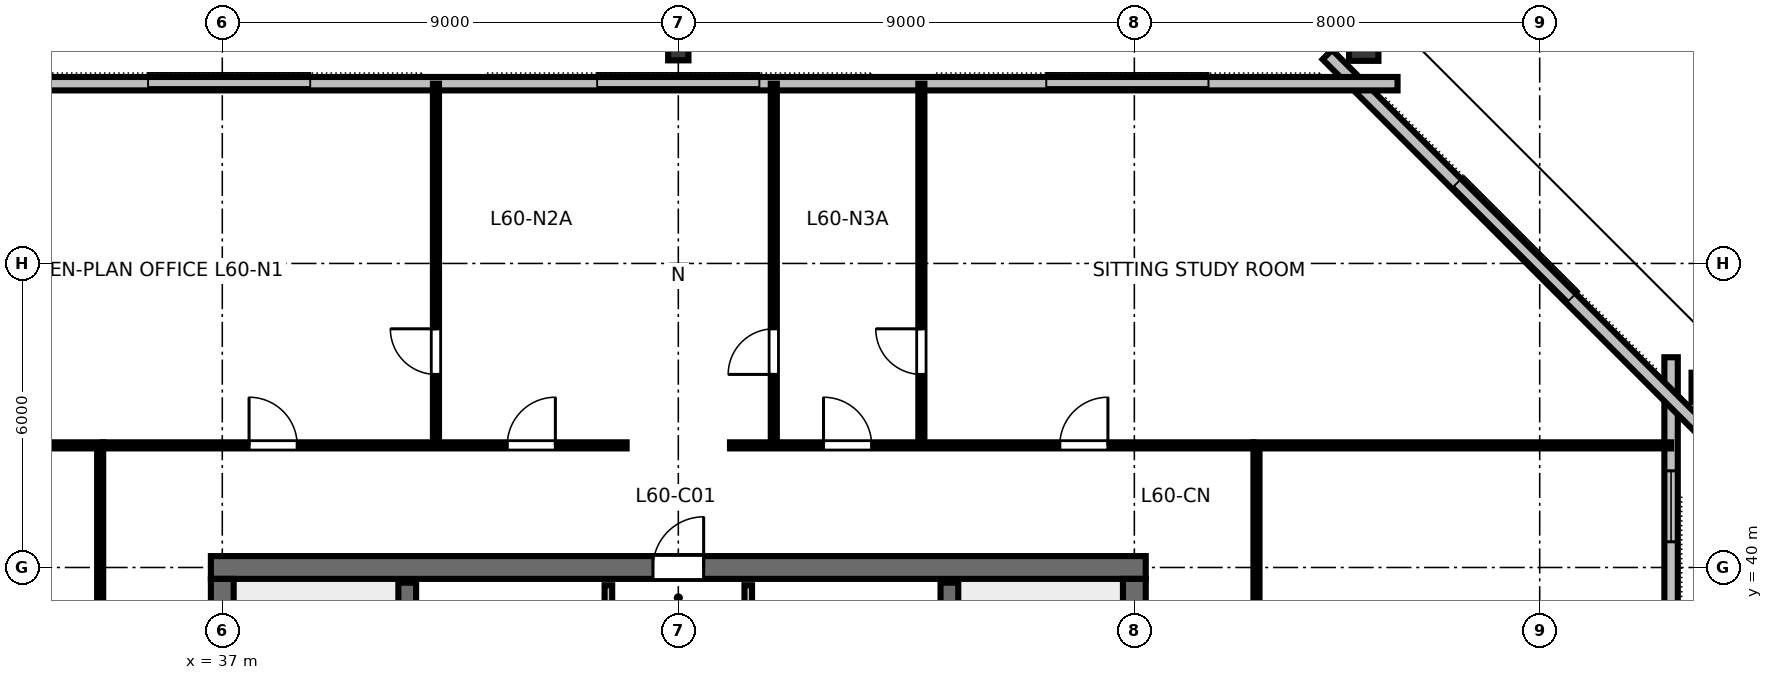
"""IFC4 building model, lengths in metres.
Left out: names, types, materials, properties, quantities, classifications, styles, units other than length and angle.
Written with IfcOpenShell. Run it as: python <this file> out.ifc"""

import sys

from ifc_helpers import new_model, si_unit, direction, frame, frame_2d, origin, origin_2d, place, context, subcontext, project, spatial, rectangle, hollow_rectangle, i_section, extrude, element, fill, save


model = new_model("IFC4")
c1 = context("Model", 3, precision=1e-05, world=origin(), true_north=direction((0.0, 1.0)))
c2 = subcontext(c1, "Body", "Model", "MODEL_VIEW")
j1 = project(units=[si_unit("LENGTHUNIT", "METRE"), si_unit("PLANEANGLEUNIT", "RADIAN")], contexts=[c1])
p1 = place(None, origin())
s1 = spatial("IfcSite", under=j1, at=p1, CompositionType="ELEMENT")
p2 = place(p1, origin())
s2 = spatial("IfcBuilding", under=s1, at=p2, CompositionType="ELEMENT")
p3 = place(p2, frame((0.0, 0.0, 227.4)))
s3 = spatial("IfcBuildingStorey", under=s2, at=p3, CompositionType="ELEMENT", Elevation=227.4)
p4 = place(p3, frame((36.775, 40.0, 0.0), z_axis=(0.0, 0.0, 1.0), x_axis=(1.0, 0.0, 0.0)))
e1 = element("IfcWall", 1, at=p4, inside=s3, PredefinedType="SHEAR", context=c2, shape_type="SweptSolid", body=[
    extrude(rectangle(XDim=18.45, YDim=0.45, at=frame_2d((9.225, 0.0))), origin(), (0.0, 0.0, 1.0), 3.36),
])
p5 = place(p4, frame((8.725, 0.0, 0.0)))
e2 = element("IfcOpeningElement", 2, at=p5, cuts=e1, PredefinedType="OPENING", context=c2, shape_type="SweptSolid", body=[
    extrude(rectangle(XDim=1.0, YDim=2.15, at=frame_2d((0.5, 1.075))), frame((0.0, 0.235, 0.0), z_axis=(0.0, -1.0, 0.0), x_axis=(1.0, 0.0, 0.0)), (0.0, 0.0, 1.0), 0.47),
])
p6 = place(p3, frame((37.0, 24.225, 0.0), z_axis=(0.0, 0.0, 1.0), x_axis=(0.0, 1.0, 0.0)))
e3 = element("IfcWall", 3, at=p6, inside=s3, PredefinedType="SHEAR", context=c2, shape_type="SweptSolid", body=[
    extrude(rectangle(XDim=15.55, YDim=0.45, at=frame_2d((7.775, 0.0))), origin(), (0.0, 0.0, 1.0), 3.36),
])
p7 = place(p6, frame((5.3, 0.0, 0.0)))
e4 = element("IfcOpeningElement", 4, at=p7, cuts=e3, PredefinedType="OPENING", context=c2, shape_type="SweptSolid", body=[
    extrude(rectangle(XDim=1.15, YDim=2.15, at=frame_2d((0.575, 1.075))), frame((0.0, 0.235, 0.0), z_axis=(0.0, -1.0, 0.0), x_axis=(1.0, 0.0, 0.0)), (0.0, 0.0, 1.0), 0.47),
])
p8 = place(p3, frame((55.0, 24.225, 0.0), z_axis=(0.0, 0.0, 1.0), x_axis=(0.0, 1.0, 0.0)))
e5 = element("IfcWall", 5, at=p8, inside=s3, PredefinedType="SHEAR", context=c2, shape_type="SweptSolid", body=[
    extrude(rectangle(XDim=15.55, YDim=0.45, at=frame_2d((7.775, 0.0))), origin(), (0.0, 0.0, 1.0), 3.36),
])
p9 = place(p8, frame((5.3, 0.0, 0.0)))
e6 = element("IfcOpeningElement", 6, at=p9, cuts=e5, PredefinedType="OPENING", context=c2, shape_type="SweptSolid", body=[
    extrude(rectangle(XDim=1.15, YDim=2.15, at=frame_2d((0.575, 1.075))), frame((0.0, 0.235, 0.0), z_axis=(0.0, -1.0, 0.0), x_axis=(1.0, 0.0, 0.0)), (0.0, 0.0, 1.0), 0.47),
])
p10 = place(p3, frame((66.347, 43.554, 0.0), z_axis=(-0.177516374376, -0.155854312843, 0.971698188738), x_axis=(0.730201092603, 0.64109572948, 0.236225803001)))
e7 = element("IfcColumn", 7, at=p10, inside=s3, PredefinedType="COLUMN", context=c2, shape_type="SweptSolid", body=[
    extrude(hollow_rectangle(XDim=0.58, YDim=0.7, WallThickness=0.032, at=origin_2d()), origin(), (0.0, 0.0, 1.0), 3.471),
])
p11 = place(p3, frame((59.527, 50.348, 0.0), z_axis=(-0.20550333397, -0.12726317196, 0.970346569422), x_axis=(0.526494647851, -0.850178443495, 0.0)))
e8 = element("IfcColumn", 8, at=p11, inside=s3, PredefinedType="COLUMN", context=c2, shape_type="SweptSolid", body=[
    extrude(hollow_rectangle(XDim=0.58, YDim=0.7, WallThickness=0.032, at=origin_2d()), origin(), (0.0, 0.0, 1.0), 3.476),
])
p12 = place(p3, frame((46.0, 50.207, 0.0), z_axis=(0.0, -0.128274255688, 0.991738733401), x_axis=(1.0, 0.0, 0.0)))
e9 = element("IfcColumn", 9, at=p12, inside=s3, PredefinedType="COLUMN", context=c2, shape_type="SweptSolid", body=[
    extrude(i_section(OverallWidth=0.401, OverallDepth=0.399, WebThickness=0.025, FlangeThickness=0.04, FilletRadius=0.025, at=origin_2d()), origin(), (0.0, 0.0, 1.0), 3.401),
])
p13 = place(p3, frame((65.593, 19.851, 0.0), z_axis=(0.0, 0.0, 1.0), x_axis=(0.0, 1.0, 0.0)))
e10 = element("IfcWall", 10, at=p13, inside=s3, PredefinedType="STANDARD", context=c2, shape_type="SweptSolid", body=[
    extrude(rectangle(XDim=24.298, YDim=0.265, at=frame_2d((12.149, 0.0))), origin(), (0.0, 0.0, 1.0), 2.832),
])
p14 = place(p13, frame((13.499, 0.0, 0.0)))
e11 = element("IfcOpeningElement", 11, at=p14, cuts=e10, PredefinedType="OPENING", context=c2, shape_type="SweptSolid", body=[
    extrude(rectangle(XDim=1.4, YDim=2.15, at=frame_2d((0.7, 1.075))), frame((0.0, 0.142, 0.0), z_axis=(0.0, -1.0, 0.0), x_axis=(1.0, 0.0, 0.0)), (0.0, 0.0, 1.0), 0.285),
])
p15 = place(p13, frame((2.241, 0.0, 0.85)))
e12 = element("IfcOpeningElement", 12, at=p15, cuts=e10, PredefinedType="OPENING", context=c2, shape_type="SweptSolid", body=[
    extrude(rectangle(XDim=1.4, YDim=1.2, at=frame_2d((0.7, 0.6))), frame((0.0, 0.142, 0.0), z_axis=(0.0, -1.0, 0.0), x_axis=(1.0, 0.0, 0.0)), (0.0, 0.0, 1.0), 0.285),
])
p16 = place(p13, frame((5.925, 0.0, 0.85)))
e13 = element("IfcOpeningElement", 13, at=p16, cuts=e10, PredefinedType="OPENING", context=c2, shape_type="SweptSolid", body=[
    extrude(rectangle(XDim=1.4, YDim=1.2, at=frame_2d((0.7, 0.6))), frame((0.0, 0.142, 0.0), z_axis=(0.0, -1.0, 0.0), x_axis=(1.0, 0.0, 0.0)), (0.0, 0.0, 1.0), 0.285),
])
p17 = place(p13, frame((9.608, 0.0, 0.85)))
e14 = element("IfcOpeningElement", 14, at=p17, cuts=e10, PredefinedType="OPENING", context=c2, shape_type="SweptSolid", body=[
    extrude(rectangle(XDim=1.4, YDim=1.2, at=frame_2d((0.7, 0.6))), frame((0.0, 0.142, 0.0), z_axis=(0.0, -1.0, 0.0), x_axis=(1.0, 0.0, 0.0)), (0.0, 0.0, 1.0), 0.285),
])
p18 = place(p13, frame((16.974, 0.0, 0.85)))
e15 = element("IfcOpeningElement", 15, at=p18, cuts=e10, PredefinedType="OPENING", context=c2, shape_type="SweptSolid", body=[
    extrude(rectangle(XDim=1.4, YDim=1.2, at=frame_2d((0.7, 0.6))), frame((0.0, 0.142, 0.0), z_axis=(0.0, -1.0, 0.0), x_axis=(1.0, 0.0, 0.0)), (0.0, 0.0, 1.0), 0.285),
])
p19 = place(p13, frame((20.657, 0.0, 0.85)))
e16 = element("IfcOpeningElement", 16, at=p19, cuts=e10, PredefinedType="OPENING", context=c2, shape_type="SweptSolid", body=[
    extrude(rectangle(XDim=1.4, YDim=1.2, at=frame_2d((0.7, 0.6))), frame((0.0, 0.142, 0.0), z_axis=(0.0, -1.0, 0.0), x_axis=(1.0, 0.0, 0.0)), (0.0, 0.0, 1.0), 0.285),
])
p20 = place(p3, frame((66.167, 42.764, 0.0), z_axis=(0.0, 0.0, 1.0), x_axis=(-0.707106781187, 0.707106781187, 0.0)))
e17 = element("IfcWall", 17, at=p20, inside=s3, PredefinedType="STANDARD", context=c2, shape_type="SweptSolid", body=[
    extrude(rectangle(XDim=10.405, YDim=0.265, at=frame_2d((5.203, 0.0))), origin(), (0.0, 0.0, 1.0), 2.832),
])
p21 = place(p3, frame((60.195, 49.547, 0.0), z_axis=(0.0, 0.0, 1.0), x_axis=(-1.0, 0.0, 0.0)))
e18 = element("IfcWall", 18, at=p21, inside=s3, PredefinedType="STANDARD", context=c2, shape_type="SweptSolid", body=[
    extrude(rectangle(XDim=28.389, YDim=0.265, at=frame_2d((14.195, 0.0))), origin(), (0.0, 0.0, 1.0), 2.832),
])
for number, where, z_axis, x_axis in (
    (19, (40.65, 32.0, 0.0), (0.0, 0.0, 1.0), (0.0, 1.0, 0.0)),
    (20, (51.35, 32.0, 0.0), (0.0, 0.0, 1.0), (0.0, 1.0, 0.0)),
):
    element("IfcWall", number, at=place(p3, frame(where, z_axis=z_axis, x_axis=x_axis)), inside=s3, PredefinedType="SHEAR", context=c2, shape_type="SweptSolid", body=[
        extrude(rectangle(XDim=7.7, YDim=0.35, at=frame_2d((3.85, 0.0))), origin(), (0.0, 0.0, 1.0), 3.6),
    ])
p22 = place(p3, frame((44.62, 35.72, 0.0), z_axis=(0.0, 0.0, 1.0), x_axis=(0.0, 1.0, 0.0)))
e21 = element("IfcWall", 21, at=p22, inside=s3, PredefinedType="PARTITIONING", context=c2, shape_type="SweptSolid", body=[
    extrude(rectangle(XDim=3.93, YDim=0.15, at=frame_2d((1.965, 0.0))), origin(), (0.0, 0.0, 1.0), 3.375),
])
p23 = place(p22, frame((1.5, 0.0, 0.0)))
e22 = element("IfcOpeningElement", 22, at=p23, cuts=e21, PredefinedType="OPENING", context=c2, shape_type="SweptSolid", body=[
    extrude(rectangle(XDim=0.9, YDim=2.15, at=frame_2d((0.45, 1.075))), frame((0.0, 0.085, 0.0), z_axis=(0.0, -1.0, 0.0), x_axis=(1.0, 0.0, 0.0)), (0.0, 0.0, 1.0), 0.17),
])
p24 = place(p3, frame((47.38, 35.72, 0.0), z_axis=(0.0, 0.0, 1.0), x_axis=(0.0, 1.0, 0.0)))
e23 = element("IfcWall", 23, at=p24, inside=s3, PredefinedType="PARTITIONING", context=c2, shape_type="SweptSolid", body=[
    extrude(rectangle(XDim=3.93, YDim=0.15, at=frame_2d((1.965, 0.0))), origin(), (0.0, 0.0, 1.0), 3.375),
])
p25 = place(p24, frame((1.5, 0.0, 0.0)))
e24 = element("IfcOpeningElement", 24, at=p25, cuts=e23, PredefinedType="OPENING", context=c2, shape_type="SweptSolid", body=[
    extrude(rectangle(XDim=0.9, YDim=2.15, at=frame_2d((0.45, 1.075))), frame((0.0, 0.085, 0.0), z_axis=(0.0, -1.0, 0.0), x_axis=(1.0, 0.0, 0.0)), (0.0, 0.0, 1.0), 0.17),
])
p26 = place(p3, frame((41.217, 42.41, 0.0), z_axis=(0.0, 0.0, 1.0), x_axis=(0.0, 1.0, 0.0)))
e25 = element("IfcWall", 25, at=p26, inside=s3, PredefinedType="PARTITIONING", context=c2, shape_type="SweptSolid", body=[
    extrude(rectangle(XDim=7.137, YDim=0.12, at=frame_2d((3.569, 0.0))), origin(), (0.0, 0.0, 1.0), 2.655),
])
p27 = place(p26, frame((1.4, 0.0, 0.0)))
e26 = element("IfcOpeningElement", 26, at=p27, cuts=e25, PredefinedType="OPENING", context=c2, shape_type="SweptSolid", body=[
    extrude(rectangle(XDim=0.9, YDim=2.15, at=frame_2d((0.45, 1.075))), frame((0.0, 0.07, 0.0), z_axis=(0.0, -1.0, 0.0), x_axis=(1.0, 0.0, 0.0)), (0.0, 0.0, 1.0), 0.14),
])
p28 = place(p3, frame((47.885, 42.41, 0.0), z_axis=(0.0, 0.0, 1.0), x_axis=(0.0, 1.0, 0.0)))
e27 = element("IfcWall", 27, at=p28, inside=s3, PredefinedType="PARTITIONING", context=c2, shape_type="SweptSolid", body=[
    extrude(rectangle(XDim=7.137, YDim=0.12, at=frame_2d((3.569, 0.0))), origin(), (0.0, 0.0, 1.0), 2.655),
])
p29 = place(p28, frame((1.4, 0.0, 0.0)))
e28 = element("IfcOpeningElement", 28, at=p29, cuts=e27, PredefinedType="OPENING", context=c2, shape_type="SweptSolid", body=[
    extrude(rectangle(XDim=0.9, YDim=2.15, at=frame_2d((0.45, 1.075))), frame((0.0, 0.07, 0.0), z_axis=(0.0, -1.0, 0.0), x_axis=(1.0, 0.0, 0.0)), (0.0, 0.0, 1.0), 0.14),
])
p30 = place(p3, frame((50.797, 42.41, 0.0), z_axis=(0.0, 0.0, 1.0), x_axis=(0.0, 1.0, 0.0)))
e29 = element("IfcWall", 29, at=p30, inside=s3, PredefinedType="PARTITIONING", context=c2, shape_type="SweptSolid", body=[
    extrude(rectangle(XDim=7.137, YDim=0.12, at=frame_2d((3.569, 0.0))), origin(), (0.0, 0.0, 1.0), 2.655),
])
p31 = place(p30, frame((1.4, 0.0, 0.0)))
e30 = element("IfcOpeningElement", 30, at=p31, cuts=e29, PredefinedType="OPENING", context=c2, shape_type="SweptSolid", body=[
    extrude(rectangle(XDim=0.9, YDim=2.15, at=frame_2d((0.45, 1.075))), frame((0.0, 0.07, 0.0), z_axis=(0.0, -1.0, 0.0), x_axis=(1.0, 0.0, 0.0)), (0.0, 0.0, 1.0), 0.14),
])
p32 = place(p3, frame((34.65, 42.41, 0.0), z_axis=(0.0, 0.0, 1.0), x_axis=(1.0, 0.0, 0.0)))
e31 = element("IfcWall", 31, at=p32, inside=s3, PredefinedType="PARTITIONING", context=c2, shape_type="SweptSolid", body=[
    extrude(rectangle(XDim=10.33, YDim=0.12, at=frame_2d((5.165, 0.0))), origin(), (0.0, 0.0, 1.0), 2.655),
])
p33 = place(p32, frame((2.878, 0.0, 0.0)))
e32 = element("IfcOpeningElement", 32, at=p33, cuts=e31, PredefinedType="OPENING", context=c2, shape_type="SweptSolid", body=[
    extrude(rectangle(XDim=0.95, YDim=2.15, at=frame_2d((0.475, 1.075))), frame((0.0, 0.07, 0.0), z_axis=(0.0, -1.0, 0.0), x_axis=(1.0, 0.0, 0.0)), (0.0, 0.0, 1.0), 0.14),
])
p34 = place(p32, frame((7.974, 0.0, 0.0)))
e33 = element("IfcOpeningElement", 33, at=p34, cuts=e31, PredefinedType="OPENING", context=c2, shape_type="SweptSolid", body=[
    extrude(rectangle(XDim=0.95, YDim=2.15, at=frame_2d((0.475, 1.075))), frame((0.0, 0.07, 0.0), z_axis=(0.0, -1.0, 0.0), x_axis=(1.0, 0.0, 0.0)), (0.0, 0.0, 1.0), 0.14),
])
p35 = place(p3, frame((47.02, 42.41, 0.0), z_axis=(0.0, 0.0, 1.0), x_axis=(1.0, 0.0, 0.0)))
e34 = element("IfcWall", 34, at=p35, inside=s3, PredefinedType="PARTITIONING", context=c2, shape_type="SweptSolid", body=[
    extrude(rectangle(XDim=10.33, YDim=0.12, at=frame_2d((5.165, 0.0))), origin(), (0.0, 0.0, 1.0), 2.655),
])
p36 = place(p35, frame((1.846, 0.0, 0.0)))
e35 = element("IfcOpeningElement", 35, at=p36, cuts=e34, PredefinedType="OPENING", context=c2, shape_type="SweptSolid", body=[
    extrude(rectangle(XDim=0.95, YDim=2.15, at=frame_2d((0.475, 1.075))), frame((0.0, 0.07, 0.0), z_axis=(0.0, -1.0, 0.0), x_axis=(1.0, 0.0, 0.0)), (0.0, 0.0, 1.0), 0.14),
])
p37 = place(p35, frame((6.509, 0.0, 0.0)))
e36 = element("IfcOpeningElement", 36, at=p37, cuts=e34, PredefinedType="OPENING", context=c2, shape_type="SweptSolid", body=[
    extrude(rectangle(XDim=0.95, YDim=2.15, at=frame_2d((0.475, 1.075))), frame((0.0, 0.07, 0.0), z_axis=(0.0, -1.0, 0.0), x_axis=(1.0, 0.0, 0.0)), (0.0, 0.0, 1.0), 0.14),
])
p38 = place(p3, frame((34.59, 21.65, 0.0), z_axis=(0.0, 0.0, 1.0), x_axis=(0.0, 1.0, 0.0)))
e37 = element("IfcWall", 37, at=p38, inside=s3, PredefinedType="PARTITIONING", context=c2, shape_type="SweptSolid", body=[
    extrude(rectangle(XDim=20.7, YDim=0.12, at=frame_2d((10.35, 0.0))), origin(), (0.0, 0.0, 1.0), 2.655),
])
p39 = place(p38, frame((5.449, 0.0, 0.0)))
e38 = element("IfcOpeningElement", 38, at=p39, cuts=e37, PredefinedType="OPENING", context=c2, shape_type="SweptSolid", body=[
    extrude(rectangle(XDim=0.95, YDim=2.15, at=frame_2d((0.475, 1.075))), frame((0.0, 0.07, 0.0), z_axis=(0.0, -1.0, 0.0), x_axis=(1.0, 0.0, 0.0)), (0.0, 0.0, 1.0), 0.14),
])
p40 = place(p38, frame((15.599, 0.0, 0.0)))
e39 = element("IfcOpeningElement", 39, at=p40, cuts=e37, PredefinedType="OPENING", context=c2, shape_type="SweptSolid", body=[
    extrude(rectangle(XDim=0.95, YDim=2.15, at=frame_2d((0.475, 1.075))), frame((0.0, 0.07, 0.0), z_axis=(0.0, -1.0, 0.0), x_axis=(1.0, 0.0, 0.0)), (0.0, 0.0, 1.0), 0.14),
])
p41 = place(p3, frame((57.41, 21.65, 0.0), z_axis=(0.0, 0.0, 1.0), x_axis=(0.0, 1.0, 0.0)))
e40 = element("IfcWall", 40, at=p41, inside=s3, PredefinedType="PARTITIONING", context=c2, shape_type="SweptSolid", body=[
    extrude(rectangle(XDim=20.7, YDim=0.12, at=frame_2d((10.35, 0.0))), origin(), (0.0, 0.0, 1.0), 2.655),
])
p42 = place(p41, frame((9.875, 0.0, 0.0)))
e41 = element("IfcOpeningElement", 41, at=p42, cuts=e40, PredefinedType="OPENING", context=c2, shape_type="SweptSolid", body=[
    extrude(rectangle(XDim=0.95, YDim=2.15, at=frame_2d((0.475, 1.075))), frame((0.0, 0.07, 0.0), z_axis=(0.0, -1.0, 0.0), x_axis=(1.0, 0.0, 0.0)), (0.0, 0.0, 1.0), 0.14),
])
for number, where, z_axis, x_axis in (
    (42, (34.65, 42.41, 0.0), (0.0, 0.0, 1.0), (-1.0, 0.0, 0.0)),
    (43, (57.35, 42.41, 0.0), (0.0, 0.0, 1.0), (1.0, 0.0, 0.0)),
):
    element("IfcWall", number, at=place(p3, frame(where, z_axis=z_axis, x_axis=x_axis)), inside=s3, PredefinedType="PARTITIONING", context=c2, shape_type="SweptSolid", body=[
        extrude(rectangle(XDim=8.243, YDim=0.12, at=frame_2d((4.121, 0.0))), origin(), (0.0, 0.0, 1.0), 2.655),
    ])
p43 = place(p19, origin())
e44 = element("IfcWindow", 44, at=p43, inside=s3, PartitioningType="SINGLE_PANEL", PredefinedType="WINDOW", context=c2, shape_type="SweptSolid", body=[
    extrude(rectangle(XDim=1.4, YDim=1.2, at=frame_2d((0.7, 0.6))), frame((0.0, 0.03, 0.0), z_axis=(0.0, -1.0, 0.0), x_axis=(1.0, 0.0, 0.0)), (0.0, 0.0, 1.0), 0.06),
])
fill(e16, e44)
p44 = place(p5, origin())
e45 = element("IfcDoor", 45, at=p44, inside=s3, OperationType="SINGLE_SWING_RIGHT", PredefinedType="DOOR", context=c2, shape_type="SweptSolid", body=[
    extrude(rectangle(XDim=1.0, YDim=2.15, at=frame_2d((0.5, 1.075))), frame((0.0, 0.025, 0.0), z_axis=(0.0, -1.0, 0.0), x_axis=(1.0, 0.0, 0.0)), (0.0, 0.0, 1.0), 0.05),
])
fill(e2, e45)
p45 = place(p27, origin())
e46 = element("IfcDoor", 46, at=p45, inside=s3, OperationType="SINGLE_SWING_RIGHT", PredefinedType="DOOR", context=c2, shape_type="SweptSolid", body=[
    extrude(rectangle(XDim=0.9, YDim=2.15, at=frame_2d((0.45, 1.075))), frame((0.0, 0.025, 0.0), z_axis=(0.0, -1.0, 0.0), x_axis=(1.0, 0.0, 0.0)), (0.0, 0.0, 1.0), 0.05),
])
fill(e26, e46)
p46 = place(p29, origin())
e47 = element("IfcDoor", 47, at=p46, inside=s3, OperationType="SINGLE_SWING_LEFT", PredefinedType="DOOR", context=c2, shape_type="SweptSolid", body=[
    extrude(rectangle(XDim=0.9, YDim=2.15, at=frame_2d((0.45, 1.075))), frame((0.0, 0.025, 0.0), z_axis=(0.0, -1.0, 0.0), x_axis=(1.0, 0.0, 0.0)), (0.0, 0.0, 1.0), 0.05),
])
fill(e28, e47)
p47 = place(p31, origin())
e48 = element("IfcDoor", 48, at=p47, inside=s3, OperationType="SINGLE_SWING_RIGHT", PredefinedType="DOOR", context=c2, shape_type="SweptSolid", body=[
    extrude(rectangle(XDim=0.9, YDim=2.15, at=frame_2d((0.45, 1.075))), frame((0.0, 0.025, 0.0), z_axis=(0.0, -1.0, 0.0), x_axis=(1.0, 0.0, 0.0)), (0.0, 0.0, 1.0), 0.05),
])
fill(e30, e48)
p48 = place(p33, origin())
e49 = element("IfcDoor", 49, at=p48, inside=s3, OperationType="SINGLE_SWING_LEFT", PredefinedType="DOOR", context=c2, shape_type="SweptSolid", body=[
    extrude(rectangle(XDim=0.95, YDim=2.15, at=frame_2d((0.475, 1.075))), frame((0.0, 0.025, 0.0), z_axis=(0.0, -1.0, 0.0), x_axis=(1.0, 0.0, 0.0)), (0.0, 0.0, 1.0), 0.05),
])
fill(e32, e49)
p49 = place(p34, origin())
e50 = element("IfcDoor", 50, at=p49, inside=s3, OperationType="SINGLE_SWING_RIGHT", PredefinedType="DOOR", context=c2, shape_type="SweptSolid", body=[
    extrude(rectangle(XDim=0.95, YDim=2.15, at=frame_2d((0.475, 1.075))), frame((0.0, 0.025, 0.0), z_axis=(0.0, -1.0, 0.0), x_axis=(1.0, 0.0, 0.0)), (0.0, 0.0, 1.0), 0.05),
])
fill(e33, e50)
p50 = place(p36, origin())
e51 = element("IfcDoor", 51, at=p50, inside=s3, OperationType="SINGLE_SWING_LEFT", PredefinedType="DOOR", context=c2, shape_type="SweptSolid", body=[
    extrude(rectangle(XDim=0.95, YDim=2.15, at=frame_2d((0.475, 1.075))), frame((0.0, 0.025, 0.0), z_axis=(0.0, -1.0, 0.0), x_axis=(1.0, 0.0, 0.0)), (0.0, 0.0, 1.0), 0.05),
])
fill(e35, e51)
p51 = place(p37, origin())
e52 = element("IfcDoor", 52, at=p51, inside=s3, OperationType="SINGLE_SWING_RIGHT", PredefinedType="DOOR", context=c2, shape_type="SweptSolid", body=[
    extrude(rectangle(XDim=0.95, YDim=2.15, at=frame_2d((0.475, 1.075))), frame((0.0, 0.025, 0.0), z_axis=(0.0, -1.0, 0.0), x_axis=(1.0, 0.0, 0.0)), (0.0, 0.0, 1.0), 0.05),
])
fill(e36, e52)
save(model, sys.argv[1])
